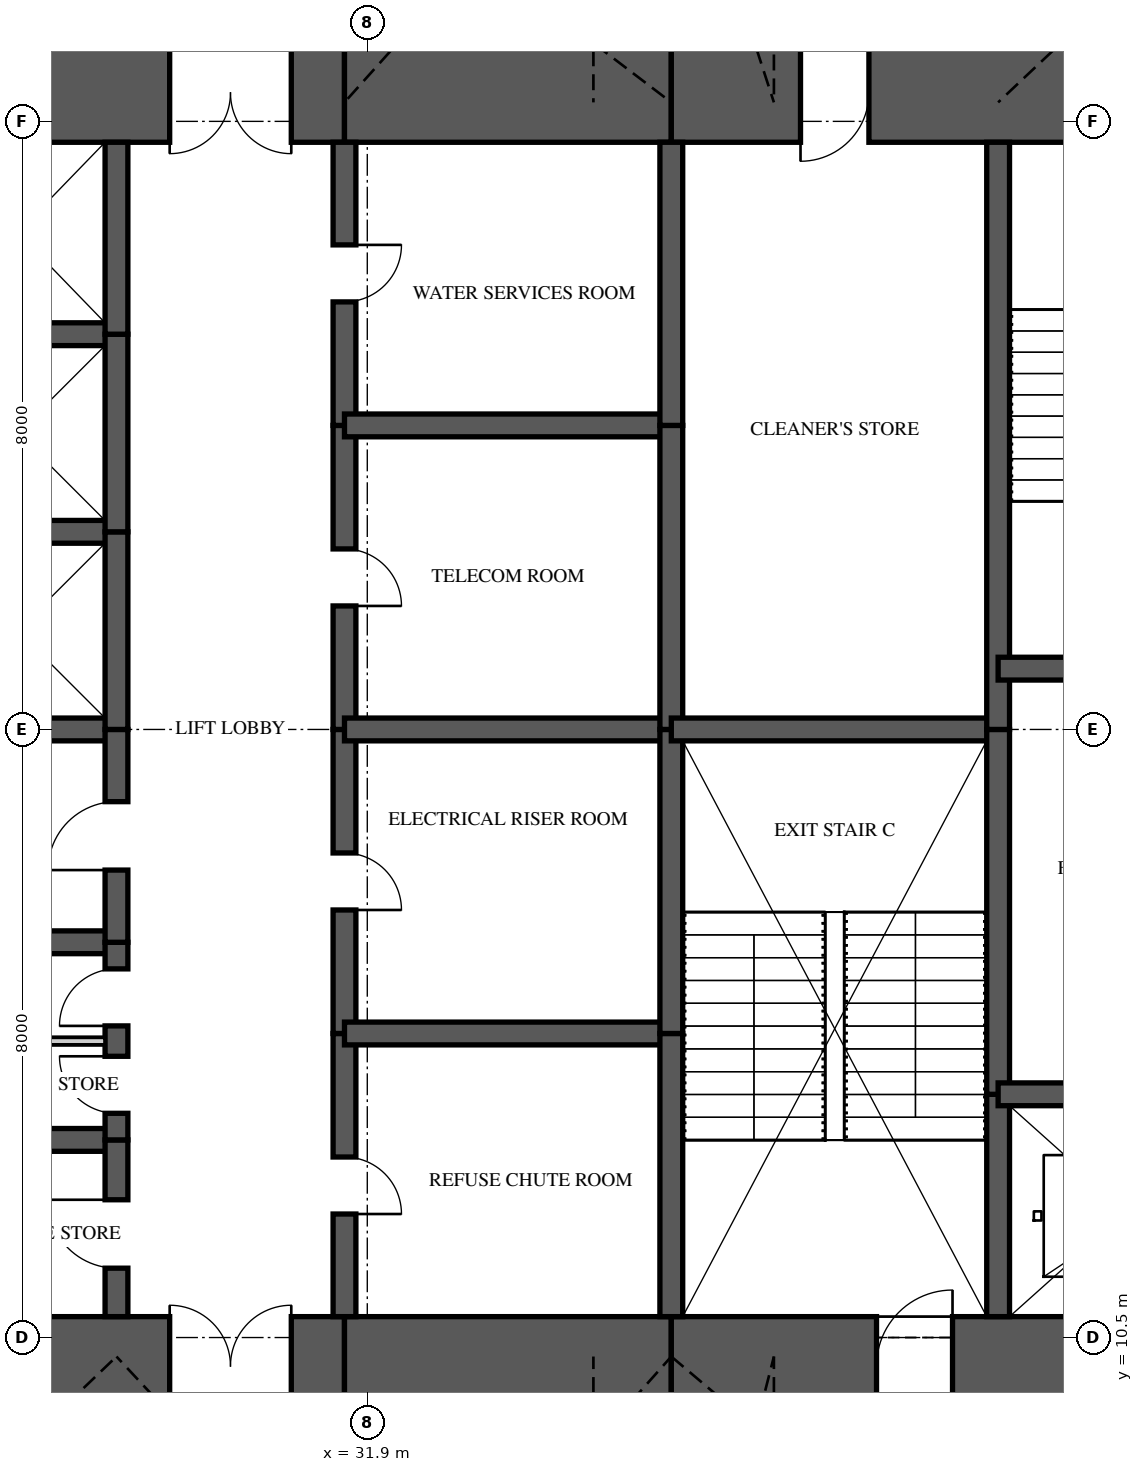
"""IFC4 building model, lengths in metres.
Left out: names, types, materials, properties, quantities, classifications, styles, units other than length and angle.
Written with IfcOpenShell. Run it as: python <this file> out.ifc"""

import sys

from ifc_helpers import new_model, si_unit, direction, frame, frame_2d, origin, place, context, subcontext, project, spatial, rectangle, extrude, element, fill, save


model = new_model("IFC4")
c1 = context("Model", 3, precision=1e-05, world=origin(), true_north=direction((0.0, 1.0)))
c2 = subcontext(c1, "Body", "Model", "MODEL_VIEW")
j1 = project(units=[si_unit("LENGTHUNIT", "METRE"), si_unit("PLANEANGLEUNIT", "RADIAN")], contexts=[c1])
p1 = place(None, origin())
s1 = spatial("IfcSite", under=j1, at=p1, CompositionType="ELEMENT")
p2 = place(p1, origin())
s2 = spatial("IfcBuilding", under=s1, at=p2, CompositionType="ELEMENT")
p3 = place(p2, frame((0.0, 0.0, 212.95)))
s3 = spatial("IfcBuildingStorey", under=s2, at=p3, CompositionType="ELEMENT", Elevation=212.95)
p4 = place(p3, frame((26.0, 10.125, 0.0), z_axis=(0.0, 0.0, 1.0), x_axis=(1.0, 0.0, 0.0)))
e1 = element("IfcWall", 1, at=p4, inside=s3, PredefinedType="SHEAR", context=c2, shape_type="SweptSolid", body=[
    extrude(rectangle(XDim=5.6, YDim=1.3, at=frame_2d((2.8, 0.0))), origin(), (0.0, 0.0, 1.0), 5.0),
])
p5 = place(p4, frame((3.3, 0.0, 0.0)))
e2 = element("IfcOpeningElement", 2, at=p5, cuts=e1, PredefinedType="OPENING", context=c2, shape_type="SweptSolid", body=[
    extrude(rectangle(XDim=1.6, YDim=2.1, at=frame_2d((0.8, 1.05))), frame((0.0, 0.66, 0.0), z_axis=(0.0, -1.0, 0.0), x_axis=(1.0, 0.0, 0.0)), (0.0, 0.0, 1.0), 1.32),
])
p6 = place(p3, frame((31.6, 10.125, 0.0), z_axis=(0.0, 0.0, 1.0), x_axis=(1.0, 0.0, 0.0)))
e3 = element("IfcWall", 3, at=p6, inside=s3, PredefinedType="SHEAR", context=c2, shape_type="SweptSolid", body=[
    extrude(rectangle(XDim=4.3, YDim=1.3, at=frame_2d((2.15, 0.0))), origin(), (0.0, 0.0, 1.0), 5.0),
])
p7 = place(p3, frame((35.9, 10.125, 0.0), z_axis=(0.0, 0.0, 1.0), x_axis=(1.0, 0.0, 0.0)))
e4 = element("IfcWall", 4, at=p7, inside=s3, PredefinedType="SHEAR", context=c2, shape_type="SweptSolid", body=[
    extrude(rectangle(XDim=8.25, YDim=1.3, at=frame_2d((4.125, 0.0))), origin(), (0.0, 0.0, 1.0), 5.0),
])
p8 = place(p7, frame((2.7, 0.0, 0.0)))
e5 = element("IfcOpeningElement", 5, at=p8, cuts=e4, PredefinedType="OPENING", context=c2, shape_type="SweptSolid", body=[
    extrude(rectangle(XDim=1.0, YDim=2.1, at=frame_2d((0.5, 1.05))), frame((0.0, 0.66, 0.0), z_axis=(0.0, -1.0, 0.0), x_axis=(1.0, 0.0, 0.0)), (0.0, 0.0, 1.0), 1.32),
])
p9 = place(p3, frame((44.15, 26.875, 0.0), z_axis=(0.0, 0.0, 1.0), x_axis=(-1.0, 0.0, 0.0)))
e6 = element("IfcWall", 6, at=p9, inside=s3, PredefinedType="SHEAR", context=c2, shape_type="SweptSolid", body=[
    extrude(rectangle(XDim=8.25, YDim=1.3, at=frame_2d((4.125, 0.0))), origin(), (0.0, 0.0, 1.0), 5.0),
])
p10 = place(p9, frame((5.65, 0.0, 0.0)))
e7 = element("IfcOpeningElement", 7, at=p10, cuts=e6, PredefinedType="OPENING", context=c2, shape_type="SweptSolid", body=[
    extrude(rectangle(XDim=0.9, YDim=2.1, at=frame_2d((0.45, 1.05))), frame((0.0, 0.66, 0.0), z_axis=(0.0, -1.0, 0.0), x_axis=(1.0, 0.0, 0.0)), (0.0, 0.0, 1.0), 1.32),
])
p11 = place(p3, frame((35.9, 26.875, 0.0), z_axis=(0.0, 0.0, 1.0), x_axis=(-1.0, 0.0, 0.0)))
e8 = element("IfcWall", 8, at=p11, inside=s3, PredefinedType="SHEAR", context=c2, shape_type="SweptSolid", body=[
    extrude(rectangle(XDim=4.3, YDim=1.3, at=frame_2d((2.15, 0.0))), origin(), (0.0, 0.0, 1.0), 5.0),
])
p12 = place(p3, frame((31.6, 26.875, 0.0), z_axis=(0.0, 0.0, 1.0), x_axis=(-1.0, 0.0, 0.0)))
e9 = element("IfcWall", 9, at=p12, inside=s3, PredefinedType="SHEAR", context=c2, shape_type="SweptSolid", body=[
    extrude(rectangle(XDim=5.6, YDim=1.3, at=frame_2d((2.8, 0.0))), origin(), (0.0, 0.0, 1.0), 5.0),
])
p13 = place(p12, frame((0.7, 0.0, 0.0)))
e10 = element("IfcOpeningElement", 10, at=p13, cuts=e9, PredefinedType="OPENING", context=c2, shape_type="SweptSolid", body=[
    extrude(rectangle(XDim=1.6, YDim=2.1, at=frame_2d((0.8, 1.05))), frame((0.0, 0.66, 0.0), z_axis=(0.0, -1.0, 0.0), x_axis=(1.0, 0.0, 0.0)), (0.0, 0.0, 1.0), 1.32),
])
p14 = place(p3, frame((28.6, 10.775, 0.0), z_axis=(0.0, 0.0, 1.0), x_axis=(0.0, 1.0, 0.0)))
e11 = element("IfcWall", 11, at=p14, inside=s3, PredefinedType="SHEAR", context=c2, shape_type="SweptSolid", body=[
    extrude(rectangle(XDim=2.325, YDim=0.3, at=frame_2d((1.163, 0.0))), origin(), (0.0, 0.0, 1.0), 5.0),
])
p15 = place(p14, frame((0.637, 0.0, 0.0)))
e12 = element("IfcOpeningElement", 12, at=p15, cuts=e11, PredefinedType="OPENING", context=c2, shape_type="SweptSolid", body=[
    extrude(rectangle(XDim=0.9, YDim=2.1, at=frame_2d((0.45, 1.05))), frame((0.0, 0.16, 0.0), z_axis=(0.0, -1.0, 0.0), x_axis=(1.0, 0.0, 0.0)), (0.0, 0.0, 1.0), 0.32),
])
p16 = place(p3, frame((28.6, 13.1, 0.0), z_axis=(0.0, 0.0, 1.0), x_axis=(0.0, 1.0, 0.0)))
e13 = element("IfcWall", 13, at=p16, inside=s3, PredefinedType="SHEAR", context=c2, shape_type="SweptSolid", body=[
    extrude(rectangle(XDim=2.6, YDim=0.3, at=frame_2d((1.3, 0.0))), origin(), (0.0, 0.0, 1.0), 5.0),
])
p17 = place(p16, frame((0.35, 0.0, 0.0)))
e14 = element("IfcOpeningElement", 14, at=p17, cuts=e13, PredefinedType="OPENING", context=c2, shape_type="SweptSolid", body=[
    extrude(rectangle(XDim=0.75, YDim=2.1, at=frame_2d((0.375, 1.05))), frame((0.0, 0.16, 0.0), z_axis=(0.0, -1.0, 0.0), x_axis=(1.0, 0.0, 0.0)), (0.0, 0.0, 1.0), 0.32),
])
p18 = place(p16, frame((1.5, 0.0, 0.0)))
e15 = element("IfcOpeningElement", 15, at=p18, cuts=e13, PredefinedType="OPENING", context=c2, shape_type="SweptSolid", body=[
    extrude(rectangle(XDim=0.75, YDim=2.1, at=frame_2d((0.375, 1.05))), frame((0.0, 0.16, 0.0), z_axis=(0.0, -1.0, 0.0), x_axis=(1.0, 0.0, 0.0)), (0.0, 0.0, 1.0), 0.32),
])
p19 = place(p3, frame((28.6, 15.7, 0.0), z_axis=(0.0, 0.0, 1.0), x_axis=(0.0, 1.0, 0.0)))
e16 = element("IfcWall", 16, at=p19, inside=s3, PredefinedType="SHEAR", context=c2, shape_type="SweptSolid", body=[
    extrude(rectangle(XDim=2.8, YDim=0.3, at=frame_2d((1.4, 0.0))), origin(), (0.0, 0.0, 1.0), 5.0),
])
p20 = place(p19, frame((0.95, 0.0, 0.0)))
e17 = element("IfcOpeningElement", 17, at=p20, cuts=e16, PredefinedType="OPENING", context=c2, shape_type="SweptSolid", body=[
    extrude(rectangle(XDim=0.9, YDim=2.1, at=frame_2d((0.45, 1.05))), frame((0.0, 0.16, 0.0), z_axis=(0.0, -1.0, 0.0), x_axis=(1.0, 0.0, 0.0)), (0.0, 0.0, 1.0), 0.32),
])
p21 = place(p3, frame((28.6, 18.5, 0.0), z_axis=(0.0, 0.0, 1.0), x_axis=(0.0, 1.0, 0.0)))
e18 = element("IfcWall", 18, at=p21, inside=s3, PredefinedType="SHEAR", context=c2, shape_type="SweptSolid", body=[
    extrude(rectangle(XDim=2.6, YDim=0.3, at=frame_2d((1.3, 0.0))), origin(), (0.0, 0.0, 1.0), 5.0),
])
p22 = place(p3, frame((28.6, 21.1, 0.0), z_axis=(0.0, 0.0, 1.0), x_axis=(0.0, 1.0, 0.0)))
e19 = element("IfcWall", 19, at=p22, inside=s3, PredefinedType="SHEAR", context=c2, shape_type="SweptSolid", body=[
    extrude(rectangle(XDim=2.6, YDim=0.3, at=frame_2d((1.3, 0.0))), origin(), (0.0, 0.0, 1.0), 5.0),
])
p23 = place(p3, frame((28.6, 23.7, 0.0), z_axis=(0.0, 0.0, 1.0), x_axis=(0.0, 1.0, 0.0)))
e20 = element("IfcWall", 20, at=p23, inside=s3, PredefinedType="SHEAR", context=c2, shape_type="SweptSolid", body=[
    extrude(rectangle(XDim=2.525, YDim=0.3, at=frame_2d((1.263, 0.0))), origin(), (0.0, 0.0, 1.0), 5.0),
])
p24 = place(p3, frame((31.6, 10.775, 0.0), z_axis=(0.0, 0.0, 1.0), x_axis=(0.0, 1.0, 0.0)))
e21 = element("IfcWall", 21, at=p24, inside=s3, PredefinedType="SHEAR", context=c2, shape_type="SweptSolid", body=[
    extrude(rectangle(XDim=3.725, YDim=0.3, at=frame_2d((1.863, 0.0))), origin(), (0.0, 0.0, 1.0), 5.0),
])
p25 = place(p24, frame((1.35, 0.0, 0.0)))
e22 = element("IfcOpeningElement", 22, at=p25, cuts=e21, PredefinedType="OPENING", context=c2, shape_type="SweptSolid", body=[
    extrude(rectangle(XDim=0.75, YDim=2.1, at=frame_2d((0.375, 1.05))), frame((0.0, 0.16, 0.0), z_axis=(0.0, -1.0, 0.0), x_axis=(1.0, 0.0, 0.0)), (0.0, 0.0, 1.0), 0.32),
])
p26 = place(p3, frame((31.6, 14.5, 0.0), z_axis=(0.0, 0.0, 1.0), x_axis=(0.0, 1.0, 0.0)))
e23 = element("IfcWall", 23, at=p26, inside=s3, PredefinedType="SHEAR", context=c2, shape_type="SweptSolid", body=[
    extrude(rectangle(XDim=4.0, YDim=0.3, at=frame_2d((2.0, 0.0))), origin(), (0.0, 0.0, 1.0), 5.0),
])
p27 = place(p26, frame((1.625, 0.0, 0.0)))
e24 = element("IfcOpeningElement", 24, at=p27, cuts=e23, PredefinedType="OPENING", context=c2, shape_type="SweptSolid", body=[
    extrude(rectangle(XDim=0.75, YDim=2.1, at=frame_2d((0.375, 1.05))), frame((0.0, 0.16, 0.0), z_axis=(0.0, -1.0, 0.0), x_axis=(1.0, 0.0, 0.0)), (0.0, 0.0, 1.0), 0.32),
])
p28 = place(p3, frame((31.6, 18.5, 0.0), z_axis=(0.0, 0.0, 1.0), x_axis=(0.0, 1.0, 0.0)))
e25 = element("IfcWall", 25, at=p28, inside=s3, PredefinedType="SHEAR", context=c2, shape_type="SweptSolid", body=[
    extrude(rectangle(XDim=4.0, YDim=0.3, at=frame_2d((2.0, 0.0))), origin(), (0.0, 0.0, 1.0), 5.0),
])
p29 = place(p28, frame((1.625, 0.0, 0.0)))
e26 = element("IfcOpeningElement", 26, at=p29, cuts=e25, PredefinedType="OPENING", context=c2, shape_type="SweptSolid", body=[
    extrude(rectangle(XDim=0.75, YDim=2.1, at=frame_2d((0.375, 1.05))), frame((0.0, 0.16, 0.0), z_axis=(0.0, -1.0, 0.0), x_axis=(1.0, 0.0, 0.0)), (0.0, 0.0, 1.0), 0.32),
])
p30 = place(p3, frame((31.6, 22.5, 0.0), z_axis=(0.0, 0.0, 1.0), x_axis=(0.0, 1.0, 0.0)))
e27 = element("IfcWall", 27, at=p30, inside=s3, PredefinedType="SHEAR", context=c2, shape_type="SweptSolid", body=[
    extrude(rectangle(XDim=3.725, YDim=0.3, at=frame_2d((1.863, 0.0))), origin(), (0.0, 0.0, 1.0), 5.0),
])
p31 = place(p30, frame((1.625, 0.0, 0.0)))
e28 = element("IfcOpeningElement", 28, at=p31, cuts=e27, PredefinedType="OPENING", context=c2, shape_type="SweptSolid", body=[
    extrude(rectangle(XDim=0.75, YDim=2.1, at=frame_2d((0.375, 1.05))), frame((0.0, 0.16, 0.0), z_axis=(0.0, -1.0, 0.0), x_axis=(1.0, 0.0, 0.0)), (0.0, 0.0, 1.0), 0.32),
])
p32 = place(p3, frame((35.9, 10.775, 0.0), z_axis=(0.0, 0.0, 1.0), x_axis=(0.0, 1.0, 0.0)))
e29 = element("IfcWall", 29, at=p32, inside=s3, PredefinedType="SHEAR", context=c2, shape_type="SweptSolid", body=[
    extrude(rectangle(XDim=3.725, YDim=0.3, at=frame_2d((1.863, 0.0))), origin(), (0.0, 0.0, 1.0), 5.0),
])
for number, where, z_axis, x_axis in (
    (30, (35.9, 14.5, 0.0), (0.0, 0.0, 1.0), (0.0, 1.0, 0.0)),
    (31, (35.9, 18.5, 0.0), (0.0, 0.0, 1.0), (0.0, 1.0, 0.0)),
):
    element("IfcWall", number, at=place(p3, frame(where, z_axis=z_axis, x_axis=x_axis)), inside=s3, PredefinedType="SHEAR", context=c2, shape_type="SweptSolid", body=[
        extrude(rectangle(XDim=4.0, YDim=0.3, at=frame_2d((2.0, 0.0))), origin(), (0.0, 0.0, 1.0), 5.0),
    ])
p33 = place(p3, frame((35.9, 22.5, 0.0), z_axis=(0.0, 0.0, 1.0), x_axis=(0.0, 1.0, 0.0)))
e32 = element("IfcWall", 32, at=p33, inside=s3, PredefinedType="SHEAR", context=c2, shape_type="SweptSolid", body=[
    extrude(rectangle(XDim=3.725, YDim=0.3, at=frame_2d((1.863, 0.0))), origin(), (0.0, 0.0, 1.0), 5.0),
])
p34 = place(p3, frame((40.2, 10.775, 0.0), z_axis=(0.0, 0.0, 1.0), x_axis=(0.0, 1.0, 0.0)))
e33 = element("IfcWall", 33, at=p34, inside=s3, PredefinedType="SHEAR", context=c2, shape_type="SweptSolid", body=[
    extrude(rectangle(XDim=2.925, YDim=0.3, at=frame_2d((1.462, 0.0))), origin(), (0.0, 0.0, 1.0), 5.0),
])
p35 = place(p3, frame((40.2, 13.7, 0.0), z_axis=(0.0, 0.0, 1.0), x_axis=(0.0, 1.0, 0.0)))
e34 = element("IfcWall", 34, at=p35, inside=s3, PredefinedType="SHEAR", context=c2, shape_type="SweptSolid", body=[
    extrude(rectangle(XDim=4.8, YDim=0.3, at=frame_2d((2.4, 0.0))), origin(), (0.0, 0.0, 1.0), 5.0),
])
p36 = place(p3, frame((40.2, 18.5, 0.0), z_axis=(0.0, 0.0, 1.0), x_axis=(0.0, 1.0, 0.0)))
e35 = element("IfcWall", 35, at=p36, inside=s3, PredefinedType="SHEAR", context=c2, shape_type="SweptSolid", body=[
    extrude(rectangle(XDim=7.725, YDim=0.3, at=frame_2d((3.863, 0.0))), origin(), (0.0, 0.0, 1.0), 5.0),
])
for number, where, z_axis, x_axis in (
    (36, (26.0, 13.1, 0.0), (0.0, 0.0, 1.0), (1.0, 0.0, 0.0)),
    (37, (26.0, 15.7, 0.0), (0.0, 0.0, 1.0), (1.0, 0.0, 0.0)),
    (38, (26.0, 18.5, 0.0), (0.0, 0.0, 1.0), (1.0, 0.0, 0.0)),
    (39, (26.0, 21.1, 0.0), (0.0, 0.0, 1.0), (1.0, 0.0, 0.0)),
    (40, (26.0, 23.7, 0.0), (0.0, 0.0, 1.0), (1.0, 0.0, 0.0)),
):
    element("IfcWall", number, at=place(p3, frame(where, z_axis=z_axis, x_axis=x_axis)), inside=s3, PredefinedType="SHEAR", context=c2, shape_type="SweptSolid", body=[
        extrude(rectangle(XDim=2.6, YDim=0.3, at=frame_2d((1.3, 0.0))), origin(), (0.0, 0.0, 1.0), 5.0),
    ])
for number, where, z_axis, x_axis in (
    (41, (31.6, 14.5, 0.0), (0.0, 0.0, 1.0), (1.0, 0.0, 0.0)),
    (42, (31.6, 18.5, 0.0), (0.0, 0.0, 1.0), (1.0, 0.0, 0.0)),
    (43, (31.6, 22.5, 0.0), (0.0, 0.0, 1.0), (1.0, 0.0, 0.0)),
):
    element("IfcWall", number, at=place(p3, frame(where, z_axis=z_axis, x_axis=x_axis)), inside=s3, PredefinedType="SHEAR", context=c2, shape_type="SweptSolid", body=[
        extrude(rectangle(XDim=4.3, YDim=0.3, at=frame_2d((2.15, 0.0))), origin(), (0.0, 0.0, 1.0), 5.0),
    ])
p37 = place(p3, frame((35.9, 18.5, 0.0), z_axis=(0.0, 0.0, 1.0), x_axis=(1.0, 0.0, 0.0)))
e44 = element("IfcWall", 44, at=p37, inside=s3, PredefinedType="SHEAR", context=c2, shape_type="SweptSolid", body=[
    extrude(rectangle(XDim=4.3, YDim=0.3, at=frame_2d((2.15, 0.0))), origin(), (0.0, 0.0, 1.0), 5.0),
])
p38 = place(p3, frame((40.2, 13.7, 0.0), z_axis=(0.0, 0.0, 1.0), x_axis=(1.0, 0.0, 0.0)))
e45 = element("IfcWall", 45, at=p38, inside=s3, PredefinedType="SHEAR", context=c2, shape_type="SweptSolid", body=[
    extrude(rectangle(XDim=3.6, YDim=0.3, at=frame_2d((1.8, 0.0))), origin(), (0.0, 0.0, 1.0), 5.0),
])
p39 = place(p38, frame((1.2, 0.0, 0.0)))
e46 = element("IfcOpeningElement", 46, at=p39, cuts=e45, PredefinedType="OPENING", context=c2, shape_type="SweptSolid", body=[
    extrude(rectangle(XDim=1.2, YDim=2.1, at=frame_2d((0.6, 1.05))), frame((0.0, 0.16, 0.0), z_axis=(0.0, -1.0, 0.0), x_axis=(1.0, 0.0, 0.0)), (0.0, 0.0, 1.0), 0.32),
])
p40 = place(p3, frame((40.2, 19.3, 0.0), z_axis=(0.0, 0.0, 1.0), x_axis=(1.0, 0.0, 0.0)))
e47 = element("IfcWall", 47, at=p40, inside=s3, PredefinedType="SHEAR", context=c2, shape_type="SweptSolid", body=[
    extrude(rectangle(XDim=3.6, YDim=0.3, at=frame_2d((1.8, 0.0))), origin(), (0.0, 0.0, 1.0), 5.0),
])
p41 = place(p40, frame((1.3, 0.0, 0.0)))
e48 = element("IfcOpeningElement", 48, at=p41, cuts=e47, PredefinedType="OPENING", context=c2, shape_type="SweptSolid", body=[
    extrude(rectangle(XDim=1.0, YDim=2.1, at=frame_2d((0.5, 1.05))), frame((0.0, 0.16, 0.0), z_axis=(0.0, -1.0, 0.0), x_axis=(1.0, 0.0, 0.0)), (0.0, 0.0, 1.0), 0.32),
])
p42 = place(p3, frame((26.15, 14.4, 0.0), z_axis=(0.0, 0.0, 1.0), x_axis=(1.0, 0.0, 0.0)))
e49 = element("IfcWall", 49, at=p42, inside=s3, PredefinedType="PARTITIONING", context=c2, shape_type="SweptSolid", body=[
    extrude(rectangle(XDim=2.3, YDim=0.1, at=frame_2d((1.15, 0.0))), origin(), (0.0, 0.0, 1.0), 4.72),
])
p43 = place(p15, origin())
e50 = element("IfcDoor", 50, at=p43, inside=s3, OperationType="SINGLE_SWING_RIGHT", PredefinedType="DOOR", context=c2, shape_type="SweptSolid", body=[
    extrude(rectangle(XDim=0.9, YDim=2.1, at=frame_2d((0.45, 1.05))), frame((0.0, 0.025, 0.0), z_axis=(0.0, -1.0, 0.0), x_axis=(1.0, 0.0, 0.0)), (0.0, 0.0, 1.0), 0.05),
])
fill(e12, e50)
p44 = place(p17, origin())
e51 = element("IfcDoor", 51, at=p44, inside=s3, OperationType="SINGLE_SWING_RIGHT", PredefinedType="DOOR", context=c2, shape_type="SweptSolid", body=[
    extrude(rectangle(XDim=0.75, YDim=2.1, at=frame_2d((0.375, 1.05))), frame((0.0, 0.025, 0.0), z_axis=(0.0, -1.0, 0.0), x_axis=(1.0, 0.0, 0.0)), (0.0, 0.0, 1.0), 0.05),
])
fill(e14, e51)
p45 = place(p18, origin())
e52 = element("IfcDoor", 52, at=p45, inside=s3, OperationType="SINGLE_SWING_LEFT", PredefinedType="DOOR", context=c2, shape_type="SweptSolid", body=[
    extrude(rectangle(XDim=0.75, YDim=2.1, at=frame_2d((0.375, 1.05))), frame((0.0, 0.025, 0.0), z_axis=(0.0, -1.0, 0.0), x_axis=(1.0, 0.0, 0.0)), (0.0, 0.0, 1.0), 0.05),
])
fill(e15, e52)
p46 = place(p20, origin())
e53 = element("IfcDoor", 53, at=p46, inside=s3, OperationType="SINGLE_SWING_LEFT", PredefinedType="DOOR", context=c2, shape_type="SweptSolid", body=[
    extrude(rectangle(XDim=0.9, YDim=2.1, at=frame_2d((0.45, 1.05))), frame((0.0, 0.025, 0.0), z_axis=(0.0, -1.0, 0.0), x_axis=(1.0, 0.0, 0.0)), (0.0, 0.0, 1.0), 0.05),
])
fill(e17, e53)
p47 = place(p5, origin())
e54 = element("IfcDoor", 54, at=p47, inside=s3, OperationType="DOUBLE_DOOR_SINGLE_SWING", PredefinedType="DOOR", context=c2, shape_type="SweptSolid", body=[
    extrude(rectangle(XDim=1.6, YDim=2.1, at=frame_2d((0.8, 1.05))), frame((0.0, 0.025, 0.0), z_axis=(0.0, -1.0, 0.0), x_axis=(1.0, 0.0, 0.0)), (0.0, 0.0, 1.0), 0.05),
])
fill(e2, e54)
p48 = place(p13, origin())
e55 = element("IfcDoor", 55, at=p48, inside=s3, OperationType="DOUBLE_DOOR_SINGLE_SWING", PredefinedType="DOOR", context=c2, shape_type="SweptSolid", body=[
    extrude(rectangle(XDim=1.6, YDim=2.1, at=frame_2d((0.8, 1.05))), frame((0.0, 0.025, 0.0), z_axis=(0.0, -1.0, 0.0), x_axis=(1.0, 0.0, 0.0)), (0.0, 0.0, 1.0), 0.05),
])
fill(e10, e55)
p49 = place(p25, frame((0.75, 0.0, 0.0), z_axis=(0.0, 0.0, 1.0), x_axis=(-1.0, 0.0, 0.0)))
e56 = element("IfcDoor", 56, at=p49, inside=s3, OperationType="SINGLE_SWING_RIGHT", PredefinedType="DOOR", context=c2, shape_type="SweptSolid", body=[
    extrude(rectangle(XDim=0.75, YDim=2.1, at=frame_2d((0.375, 1.05))), frame((0.0, 0.025, 0.0), z_axis=(0.0, -1.0, 0.0), x_axis=(1.0, 0.0, 0.0)), (0.0, 0.0, 1.0), 0.05),
])
fill(e22, e56)
p50 = place(p27, frame((0.75, 0.0, 0.0), z_axis=(0.0, 0.0, 1.0), x_axis=(-1.0, 0.0, 0.0)))
e57 = element("IfcDoor", 57, at=p50, inside=s3, OperationType="SINGLE_SWING_RIGHT", PredefinedType="DOOR", context=c2, shape_type="SweptSolid", body=[
    extrude(rectangle(XDim=0.75, YDim=2.1, at=frame_2d((0.375, 1.05))), frame((0.0, 0.025, 0.0), z_axis=(0.0, -1.0, 0.0), x_axis=(1.0, 0.0, 0.0)), (0.0, 0.0, 1.0), 0.05),
])
fill(e24, e57)
p51 = place(p29, frame((0.75, 0.0, 0.0), z_axis=(0.0, 0.0, 1.0), x_axis=(-1.0, 0.0, 0.0)))
e58 = element("IfcDoor", 58, at=p51, inside=s3, OperationType="SINGLE_SWING_RIGHT", PredefinedType="DOOR", context=c2, shape_type="SweptSolid", body=[
    extrude(rectangle(XDim=0.75, YDim=2.1, at=frame_2d((0.375, 1.05))), frame((0.0, 0.025, 0.0), z_axis=(0.0, -1.0, 0.0), x_axis=(1.0, 0.0, 0.0)), (0.0, 0.0, 1.0), 0.05),
])
fill(e26, e58)
p52 = place(p31, frame((0.75, 0.0, 0.0), z_axis=(0.0, 0.0, 1.0), x_axis=(-1.0, 0.0, 0.0)))
e59 = element("IfcDoor", 59, at=p52, inside=s3, OperationType="SINGLE_SWING_LEFT", PredefinedType="DOOR", context=c2, shape_type="SweptSolid", body=[
    extrude(rectangle(XDim=0.75, YDim=2.1, at=frame_2d((0.375, 1.05))), frame((0.0, 0.025, 0.0), z_axis=(0.0, -1.0, 0.0), x_axis=(1.0, 0.0, 0.0)), (0.0, 0.0, 1.0), 0.05),
])
fill(e28, e59)
p53 = place(p8, origin())
e60 = element("IfcDoor", 60, at=p53, inside=s3, OperationType="SINGLE_SWING_RIGHT", PredefinedType="DOOR", context=c2, shape_type="SweptSolid", body=[
    extrude(rectangle(XDim=1.0, YDim=2.1, at=frame_2d((0.5, 1.05))), frame((0.0, 0.025, 0.0), z_axis=(0.0, -1.0, 0.0), x_axis=(1.0, 0.0, 0.0)), (0.0, 0.0, 1.0), 0.05),
])
fill(e5, e60)
p54 = place(p10, origin())
e61 = element("IfcDoor", 61, at=p54, inside=s3, OperationType="SINGLE_SWING_RIGHT", PredefinedType="DOOR", context=c2, shape_type="SweptSolid", body=[
    extrude(rectangle(XDim=0.9, YDim=2.1, at=frame_2d((0.45, 1.05))), frame((0.0, 0.47, 0.0), z_axis=(0.0, -1.0, 0.0), x_axis=(1.0, 0.0, 0.0)), (0.0, 0.0, 1.0), 0.8),
])
fill(e7, e61)
save(model, sys.argv[1])
